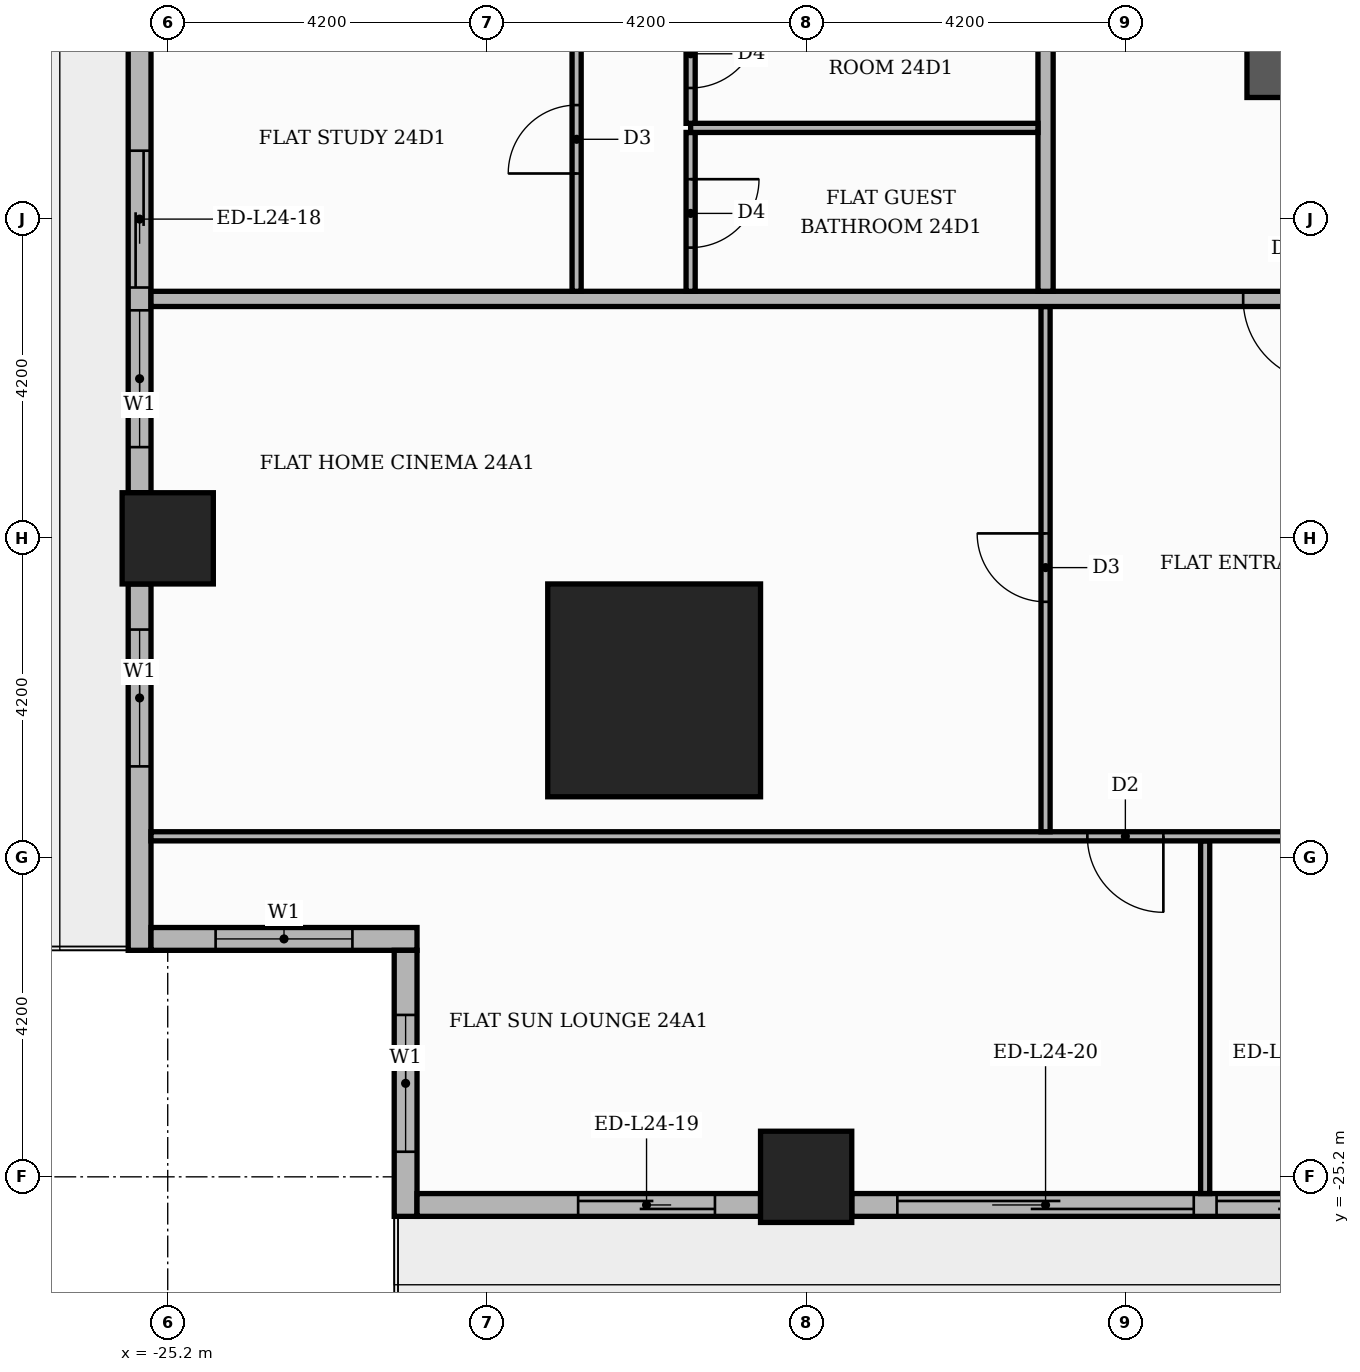
"""IFC4 building model, lengths in metres.
Left out: names, types, materials, properties, quantities, classifications, styles, units other than length and angle.
Written with IfcOpenShell. Run it as: python <this file> out.ifc"""

import sys

from ifc_helpers import new_model, si_unit, direction, frame, frame_2d, origin, origin_2d, place, context, subcontext, project, spatial, rectangle, extrude, element, fill, save


model = new_model("IFC4")
c1 = context("Model", 3, precision=1e-05, world=origin(), true_north=direction((0.0, 1.0)))
c2 = subcontext(c1, "Body", "Model", "MODEL_VIEW")
j1 = project(units=[si_unit("LENGTHUNIT", "METRE"), si_unit("PLANEANGLEUNIT", "RADIAN")], contexts=[c1])
p1 = place(None, origin())
s1 = spatial("IfcSite", under=j1, at=p1, CompositionType="ELEMENT")
p2 = place(p1, origin())
s2 = spatial("IfcBuilding", under=s1, at=p2, CompositionType="ELEMENT")
p3 = place(p2, frame((0.0, 0.0, 102.6)))
s3 = spatial("IfcBuildingStorey", under=s2, at=p3, CompositionType="ELEMENT", Elevation=102.6)
p4 = place(p3, frame((-11.0, -10.55, 0.0), z_axis=(0.0, 0.0, 1.0), x_axis=(1.0, 0.0, 0.0)))
e1 = element("IfcWall", 1, at=p4, inside=s3, PredefinedType="SHEAR", context=c2, shape_type="SweptSolid", body=[
    extrude(rectangle(XDim=22.0, YDim=0.9, at=frame_2d((11.0, 0.0))), origin(), (0.0, 0.0, 1.0), 3.48),
])
p5 = place(p4, frame((7.4, 0.0, 0.0)))
e2 = element("IfcOpeningElement", 2, at=p5, cuts=e1, PredefinedType="OPENING", context=c2, shape_type="SweptSolid", body=[
    extrude(rectangle(XDim=1.8, YDim=2.2, at=frame_2d((0.9, 1.1))), frame((0.0, 0.46, 0.0), z_axis=(0.0, -1.0, 0.0), x_axis=(1.0, 0.0, 0.0)), (0.0, 0.0, 1.0), 0.92),
])
p6 = place(p3, frame((-18.8, -18.8, 0.0), z_axis=(0.0, 0.0, 1.0), x_axis=(1.0, 0.0, 0.0)))
e3 = element("IfcColumn", 3, at=p6, inside=s3, PredefinedType="COLUMN", context=c2, shape_type="SweptSolid", body=[
    extrude(rectangle(XDim=2.8, YDim=2.8, at=origin_2d()), origin(), (0.0, 0.0, 1.0), 3.9),
])
for number, where, z_axis, x_axis in (
    (4, (-16.8, -25.2, 0.0), (0.0, 0.0, 1.0), (1.0, 0.0, 0.0)),
    (5, (-25.2, -16.8, 0.0), (0.0, 0.0, 1.0), (1.0, 0.0, 0.0)),
):
    element("IfcColumn", number, at=place(p3, frame(where, z_axis=z_axis, x_axis=x_axis)), inside=s3, PredefinedType="COLUMN", context=c2, shape_type="SweptSolid", body=[
        extrude(rectangle(XDim=1.2, YDim=1.2, at=origin_2d()), origin(), (0.0, 0.0, 1.0), 3.9),
    ])
p7 = place(p3, frame((-25.57, -9.75, 0.0), z_axis=(0.0, 0.0, 1.0), x_axis=(0.0, -1.0, 0.0)))
e6 = element("IfcWall", 6, at=p7, inside=s3, PredefinedType="STANDARD", context=c2, shape_type="SweptSolid", body=[
    extrude(rectangle(XDim=6.45, YDim=0.3, at=frame_2d((3.225, 0.0))), origin(), (0.0, 0.0, 1.0), 3.48),
])
p8 = place(p7, frame((1.95, 0.0, 0.0)))
e7 = element("IfcOpeningElement", 7, at=p8, cuts=e6, PredefinedType="OPENING", context=c2, shape_type="SweptSolid", body=[
    extrude(rectangle(XDim=1.8, YDim=2.4, at=frame_2d((0.9, 1.2))), frame((0.0, 0.16, 0.0), z_axis=(0.0, -1.0, 0.0), x_axis=(1.0, 0.0, 0.0)), (0.0, 0.0, 1.0), 0.32),
])
p9 = place(p7, frame((4.05, 0.0, 0.9)))
e8 = element("IfcOpeningElement", 8, at=p9, cuts=e6, PredefinedType="OPENING", context=c2, shape_type="SweptSolid", body=[
    extrude(rectangle(XDim=1.8, YDim=2.1, at=frame_2d((0.9, 1.05))), frame((0.0, 0.16, 0.0), z_axis=(0.0, -1.0, 0.0), x_axis=(1.0, 0.0, 0.0)), (0.0, 0.0, 1.0), 0.32),
])
p10 = place(p3, frame((-25.57, -17.4, 0.0), z_axis=(0.0, 0.0, 1.0), x_axis=(0.0, -1.0, 0.0)))
e9 = element("IfcWall", 9, at=p10, inside=s3, PredefinedType="STANDARD", context=c2, shape_type="SweptSolid", body=[
    extrude(rectangle(XDim=4.82, YDim=0.3, at=frame_2d((2.41, 0.0))), origin(), (0.0, 0.0, 1.0), 3.48),
])
p11 = place(p10, frame((0.6, 0.0, 0.9)))
e10 = element("IfcOpeningElement", 10, at=p11, cuts=e9, PredefinedType="OPENING", context=c2, shape_type="SweptSolid", body=[
    extrude(rectangle(XDim=1.8, YDim=2.1, at=frame_2d((0.9, 1.05))), frame((0.0, 0.16, 0.0), z_axis=(0.0, -1.0, 0.0), x_axis=(1.0, 0.0, 0.0)), (0.0, 0.0, 1.0), 0.32),
])
p12 = place(p3, frame((-25.42, -22.07, 0.0), z_axis=(0.0, 0.0, 1.0), x_axis=(1.0, 0.0, 0.0)))
e11 = element("IfcWall", 11, at=p12, inside=s3, PredefinedType="STANDARD", context=c2, shape_type="SweptSolid", body=[
    extrude(rectangle(XDim=3.5, YDim=0.3, at=frame_2d((1.75, 0.0))), origin(), (0.0, 0.0, 1.0), 3.48),
])
p13 = place(p12, frame((0.85, 0.0, 0.9)))
e12 = element("IfcOpeningElement", 12, at=p13, cuts=e11, PredefinedType="OPENING", context=c2, shape_type="SweptSolid", body=[
    extrude(rectangle(XDim=1.8, YDim=2.1, at=frame_2d((0.9, 1.05))), frame((0.0, 0.16, 0.0), z_axis=(0.0, -1.0, 0.0), x_axis=(1.0, 0.0, 0.0)), (0.0, 0.0, 1.0), 0.32),
])
p14 = place(p3, frame((-22.07, -22.22, 0.0), z_axis=(0.0, 0.0, 1.0), x_axis=(0.0, -1.0, 0.0)))
e13 = element("IfcWall", 13, at=p14, inside=s3, PredefinedType="STANDARD", context=c2, shape_type="SweptSolid", body=[
    extrude(rectangle(XDim=3.5, YDim=0.3, at=frame_2d((1.75, 0.0))), origin(), (0.0, 0.0, 1.0), 3.48),
])
p15 = place(p14, frame((0.85, 0.0, 0.9)))
e14 = element("IfcOpeningElement", 14, at=p15, cuts=e13, PredefinedType="OPENING", context=c2, shape_type="SweptSolid", body=[
    extrude(rectangle(XDim=1.8, YDim=2.1, at=frame_2d((0.9, 1.05))), frame((0.0, 0.16, 0.0), z_axis=(0.0, -1.0, 0.0), x_axis=(1.0, 0.0, 0.0)), (0.0, 0.0, 1.0), 0.32),
])
p16 = place(p3, frame((-21.92, -25.57, 0.0), z_axis=(0.0, 0.0, 1.0), x_axis=(1.0, 0.0, 0.0)))
e15 = element("IfcWall", 15, at=p16, inside=s3, PredefinedType="STANDARD", context=c2, shape_type="SweptSolid", body=[
    extrude(rectangle(XDim=4.52, YDim=0.3, at=frame_2d((2.26, 0.0))), origin(), (0.0, 0.0, 1.0), 3.48),
])
p17 = place(p16, frame((2.12, 0.0, 0.0)))
e16 = element("IfcOpeningElement", 16, at=p17, cuts=e15, PredefinedType="OPENING", context=c2, shape_type="SweptSolid", body=[
    extrude(rectangle(XDim=1.8, YDim=2.4, at=frame_2d((0.9, 1.2))), frame((0.0, 0.16, 0.0), z_axis=(0.0, -1.0, 0.0), x_axis=(1.0, 0.0, 0.0)), (0.0, 0.0, 1.0), 0.32),
])
p18 = place(p3, frame((-16.2, -25.57, 0.0), z_axis=(0.0, 0.0, 1.0), x_axis=(1.0, 0.0, 0.0)))
e17 = element("IfcWall", 17, at=p18, inside=s3, PredefinedType="STANDARD", context=c2, shape_type="SweptSolid", body=[
    extrude(rectangle(XDim=7.2, YDim=0.3, at=frame_2d((3.6, 0.0))), origin(), (0.0, 0.0, 1.0), 3.48),
])
p19 = place(p18, frame((0.6, 0.0, 0.0)))
e18 = element("IfcOpeningElement", 18, at=p19, cuts=e17, PredefinedType="OPENING", context=c2, shape_type="SweptSolid", body=[
    extrude(rectangle(XDim=3.9, YDim=2.4, at=frame_2d((1.95, 1.2))), frame((0.0, 0.16, 0.0), z_axis=(0.0, -1.0, 0.0), x_axis=(1.0, 0.0, 0.0)), (0.0, 0.0, 1.0), 0.32),
])
p20 = place(p18, frame((4.8, 0.0, 0.0)))
e19 = element("IfcOpeningElement", 19, at=p20, cuts=e17, PredefinedType="OPENING", context=c2, shape_type="SweptSolid", body=[
    extrude(rectangle(XDim=1.8, YDim=2.4, at=frame_2d((0.9, 1.2))), frame((0.0, 0.16, 0.0), z_axis=(0.0, -1.0, 0.0), x_axis=(1.0, 0.0, 0.0)), (0.0, 0.0, 1.0), 0.32),
])
p21 = place(p3, frame((-11.55, -25.42, 0.0), z_axis=(0.0, 0.0, 1.0), x_axis=(0.0, 1.0, 0.0)))
e20 = element("IfcWall", 20, at=p21, inside=s3, PredefinedType="PARTITIONING", context=c2, shape_type="SweptSolid", body=[
    extrude(rectangle(XDim=4.64, YDim=0.12, at=frame_2d((2.32, 0.0))), origin(), (0.0, 0.0, 1.0), 3.48),
])
p22 = place(p3, frame((-25.42, -20.72, 0.0), z_axis=(0.0, 0.0, 1.0), x_axis=(1.0, 0.0, 0.0)))
e21 = element("IfcWall", 21, at=p22, inside=s3, PredefinedType="PARTITIONING", context=c2, shape_type="SweptSolid", body=[
    extrude(rectangle(XDim=38.97, YDim=0.12, at=frame_2d((19.485, 0.0))), origin(), (0.0, 0.0, 1.0), 3.48),
])
p23 = place(p22, frame((12.32, 0.0, 0.0)))
e22 = element("IfcOpeningElement", 22, at=p23, cuts=e21, PredefinedType="OPENING", context=c2, shape_type="SweptSolid", body=[
    extrude(rectangle(XDim=1.0, YDim=2.1, at=frame_2d((0.5, 1.05))), frame((0.0, 0.07, 0.0), z_axis=(0.0, -1.0, 0.0), x_axis=(1.0, 0.0, 0.0)), (0.0, 0.0, 1.0), 0.14),
])
p24 = place(p22, frame((17.57, 0.0, 0.0)))
e23 = element("IfcOpeningElement", 23, at=p24, cuts=e21, PredefinedType="OPENING", context=c2, shape_type="SweptSolid", body=[
    extrude(rectangle(XDim=1.0, YDim=2.1, at=frame_2d((0.5, 1.05))), frame((0.0, 0.07, 0.0), z_axis=(0.0, -1.0, 0.0), x_axis=(1.0, 0.0, 0.0)), (0.0, 0.0, 1.0), 0.14),
])
p25 = place(p22, frame((24.97, 0.0, 0.0)))
e24 = element("IfcOpeningElement", 24, at=p25, cuts=e21, PredefinedType="OPENING", context=c2, shape_type="SweptSolid", body=[
    extrude(rectangle(XDim=0.9, YDim=2.1, at=frame_2d((0.45, 1.05))), frame((0.0, 0.07, 0.0), z_axis=(0.0, -1.0, 0.0), x_axis=(1.0, 0.0, 0.0)), (0.0, 0.0, 1.0), 0.14),
])
p26 = place(p22, frame((34.42, 0.0, 0.0)))
e25 = element("IfcOpeningElement", 25, at=p26, cuts=e21, PredefinedType="OPENING", context=c2, shape_type="SweptSolid", body=[
    extrude(rectangle(XDim=0.9, YDim=2.1, at=frame_2d((0.45, 1.05))), frame((0.0, 0.07, 0.0), z_axis=(0.0, -1.0, 0.0), x_axis=(1.0, 0.0, 0.0)), (0.0, 0.0, 1.0), 0.14),
])
p27 = place(p3, frame((-13.65, -20.66, 0.0), z_axis=(0.0, 0.0, 1.0), x_axis=(0.0, 1.0, 0.0)))
e26 = element("IfcWall", 26, at=p27, inside=s3, PredefinedType="PARTITIONING", context=c2, shape_type="SweptSolid", body=[
    extrude(rectangle(XDim=6.91, YDim=0.12, at=frame_2d((3.455, 0.0))), origin(), (0.0, 0.0, 1.0), 3.48),
])
p28 = place(p27, frame((3.025, 0.0, 0.0)))
e27 = element("IfcOpeningElement", 27, at=p28, cuts=e26, PredefinedType="OPENING", context=c2, shape_type="SweptSolid", body=[
    extrude(rectangle(XDim=0.9, YDim=2.1, at=frame_2d((0.45, 1.05))), frame((0.0, 0.07, 0.0), z_axis=(0.0, -1.0, 0.0), x_axis=(1.0, 0.0, 0.0)), (0.0, 0.0, 1.0), 0.14),
])
p29 = place(p3, frame((-25.42, -13.65, 0.0), z_axis=(0.0, 0.0, 1.0), x_axis=(1.0, 0.0, 0.0)))
e28 = element("IfcWall", 28, at=p29, inside=s3, PredefinedType="PARTITIONING", context=c2, shape_type="SweptSolid", body=[
    extrude(rectangle(XDim=39.07, YDim=0.2, at=frame_2d((19.535, 0.0))), origin(), (0.0, 0.0, 1.0), 3.48),
])
p30 = place(p29, frame((14.37, 0.0, 0.0)))
e29 = element("IfcOpeningElement", 29, at=p30, cuts=e28, PredefinedType="OPENING", context=c2, shape_type="SweptSolid", body=[
    extrude(rectangle(XDim=1.1, YDim=2.4, at=frame_2d((0.55, 1.2))), frame((0.0, 0.11, 0.0), z_axis=(0.0, -1.0, 0.0), x_axis=(1.0, 0.0, 0.0)), (0.0, 0.0, 1.0), 0.22),
])
p31 = place(p3, frame((-19.82, -13.55, 0.0), z_axis=(0.0, 0.0, 1.0), x_axis=(0.0, 1.0, 0.0)))
e30 = element("IfcWall", 30, at=p31, inside=s3, PredefinedType="PARTITIONING", context=c2, shape_type="SweptSolid", body=[
    extrude(rectangle(XDim=4.04, YDim=0.12, at=frame_2d((2.02, 0.0))), origin(), (0.0, 0.0, 1.0), 3.48),
])
p32 = place(p31, frame((1.55, 0.0, 0.0)))
e31 = element("IfcOpeningElement", 31, at=p32, cuts=e30, PredefinedType="OPENING", context=c2, shape_type="SweptSolid", body=[
    extrude(rectangle(XDim=0.9, YDim=2.1, at=frame_2d((0.45, 1.05))), frame((0.0, 0.07, 0.0), z_axis=(0.0, -1.0, 0.0), x_axis=(1.0, 0.0, 0.0)), (0.0, 0.0, 1.0), 0.14),
])
p33 = place(p3, frame((-18.32, -13.55, 0.0), z_axis=(0.0, 0.0, 1.0), x_axis=(0.0, 1.0, 0.0)))
e32 = element("IfcWall", 32, at=p33, inside=s3, PredefinedType="PARTITIONING", context=c2, shape_type="SweptSolid", body=[
    extrude(rectangle(XDim=2.09, YDim=0.12, at=frame_2d((1.045, 0.0))), origin(), (0.0, 0.0, 1.0), 3.48),
])
p34 = place(p33, frame((0.575, 0.0, 0.0)))
e33 = element("IfcOpeningElement", 33, at=p34, cuts=e32, PredefinedType="OPENING", context=c2, shape_type="SweptSolid", body=[
    extrude(rectangle(XDim=0.9, YDim=2.1, at=frame_2d((0.45, 1.05))), frame((0.0, 0.07, 0.0), z_axis=(0.0, -1.0, 0.0), x_axis=(1.0, 0.0, 0.0)), (0.0, 0.0, 1.0), 0.14),
])
p35 = place(p3, frame((-13.65, -13.55, 0.0), z_axis=(0.0, 0.0, 1.0), x_axis=(0.0, 1.0, 0.0)))
e34 = element("IfcWall", 34, at=p35, inside=s3, PredefinedType="PARTITIONING", context=c2, shape_type="SweptSolid", body=[
    extrude(rectangle(XDim=27.1, YDim=0.2, at=frame_2d((13.55, 0.0))), origin(), (0.0, 0.0, 1.0), 3.48),
])
p36 = place(p35, frame((23.5, 0.0, 0.0)))
e35 = element("IfcOpeningElement", 35, at=p36, cuts=e34, PredefinedType="OPENING", context=c2, shape_type="SweptSolid", body=[
    extrude(rectangle(XDim=1.1, YDim=2.4, at=frame_2d((0.55, 1.2))), frame((0.0, 0.11, 0.0), z_axis=(0.0, -1.0, 0.0), x_axis=(1.0, 0.0, 0.0)), (0.0, 0.0, 1.0), 0.22),
])
p37 = place(p3, frame((-18.32, -11.4, 0.0), z_axis=(0.0, 0.0, 1.0), x_axis=(1.0, 0.0, 0.0)))
e36 = element("IfcWall", 36, at=p37, inside=s3, PredefinedType="PARTITIONING", context=c2, shape_type="SweptSolid", body=[
    extrude(rectangle(XDim=4.57, YDim=0.12, at=frame_2d((2.285, 0.0))), origin(), (0.0, 0.0, 1.0), 3.48),
])
p38 = place(p3, frame((-18.32, -11.34, 0.0), z_axis=(0.0, 0.0, 1.0), x_axis=(0.0, 1.0, 0.0)))
e37 = element("IfcWall", 37, at=p38, inside=s3, PredefinedType="PARTITIONING", context=c2, shape_type="SweptSolid", body=[
    extrude(rectangle(XDim=1.83, YDim=0.12, at=frame_2d((0.915, 0.0))), origin(), (0.0, 0.0, 1.0), 3.48),
])
p39 = place(p38, frame((0.465, 0.0, 0.0)))
e38 = element("IfcOpeningElement", 38, at=p39, cuts=e37, PredefinedType="OPENING", context=c2, shape_type="SweptSolid", body=[
    extrude(rectangle(XDim=0.9, YDim=2.1, at=frame_2d((0.45, 1.05))), frame((0.0, 0.07, 0.0), z_axis=(0.0, -1.0, 0.0), x_axis=(1.0, 0.0, 0.0)), (0.0, 0.0, 1.0), 0.14),
])
p40 = place(p8, origin())
e39 = element("IfcDoor", 39, at=p40, inside=s3, OperationType="SLIDING_TO_RIGHT", PredefinedType="DOOR", context=c2, shape_type="SweptSolid", body=[
    extrude(rectangle(XDim=1.8, YDim=2.4, at=frame_2d((0.9, 1.2))), frame((0.0, 0.025, 0.0), z_axis=(0.0, -1.0, 0.0), x_axis=(1.0, 0.0, 0.0)), (0.0, 0.0, 1.0), 0.05),
])
fill(e7, e39)
p41 = place(p9, origin())
e40 = element("IfcWindow", 40, at=p41, inside=s3, PartitioningType="SINGLE_PANEL", PredefinedType="WINDOW", context=c2, shape_type="SweptSolid", body=[
    extrude(rectangle(XDim=1.8, YDim=2.1, at=frame_2d((0.9, 1.05))), frame((0.0, 0.03, 0.0), z_axis=(0.0, -1.0, 0.0), x_axis=(1.0, 0.0, 0.0)), (0.0, 0.0, 1.0), 0.06),
])
fill(e8, e40)
p42 = place(p11, origin())
e41 = element("IfcWindow", 41, at=p42, inside=s3, PartitioningType="SINGLE_PANEL", PredefinedType="WINDOW", context=c2, shape_type="SweptSolid", body=[
    extrude(rectangle(XDim=1.8, YDim=2.1, at=frame_2d((0.9, 1.05))), frame((0.0, 0.03, 0.0), z_axis=(0.0, -1.0, 0.0), x_axis=(1.0, 0.0, 0.0)), (0.0, 0.0, 1.0), 0.06),
])
fill(e10, e41)
p43 = place(p13, origin())
e42 = element("IfcWindow", 42, at=p43, inside=s3, PartitioningType="SINGLE_PANEL", PredefinedType="WINDOW", context=c2, shape_type="SweptSolid", body=[
    extrude(rectangle(XDim=1.8, YDim=2.1, at=frame_2d((0.9, 1.05))), frame((0.0, 0.03, 0.0), z_axis=(0.0, -1.0, 0.0), x_axis=(1.0, 0.0, 0.0)), (0.0, 0.0, 1.0), 0.06),
])
fill(e12, e42)
p44 = place(p15, origin())
e43 = element("IfcWindow", 43, at=p44, inside=s3, PartitioningType="SINGLE_PANEL", PredefinedType="WINDOW", context=c2, shape_type="SweptSolid", body=[
    extrude(rectangle(XDim=1.8, YDim=2.1, at=frame_2d((0.9, 1.05))), frame((0.0, 0.03, 0.0), z_axis=(0.0, -1.0, 0.0), x_axis=(1.0, 0.0, 0.0)), (0.0, 0.0, 1.0), 0.06),
])
fill(e14, e43)
p45 = place(p17, origin())
e44 = element("IfcDoor", 44, at=p45, inside=s3, OperationType="SLIDING_TO_RIGHT", PredefinedType="DOOR", context=c2, shape_type="SweptSolid", body=[
    extrude(rectangle(XDim=1.8, YDim=2.4, at=frame_2d((0.9, 1.2))), frame((0.0, 0.025, 0.0), z_axis=(0.0, -1.0, 0.0), x_axis=(1.0, 0.0, 0.0)), (0.0, 0.0, 1.0), 0.05),
])
fill(e16, e44)
p46 = place(p19, origin())
e45 = element("IfcDoor", 45, at=p46, inside=s3, OperationType="SLIDING_TO_LEFT", PredefinedType="DOOR", context=c2, shape_type="SweptSolid", body=[
    extrude(rectangle(XDim=3.9, YDim=2.4, at=frame_2d((1.95, 1.2))), frame((0.0, 0.025, 0.0), z_axis=(0.0, -1.0, 0.0), x_axis=(1.0, 0.0, 0.0)), (0.0, 0.0, 1.0), 0.05),
])
fill(e18, e45)
p47 = place(p20, origin())
e46 = element("IfcDoor", 46, at=p47, inside=s3, OperationType="SLIDING_TO_RIGHT", PredefinedType="DOOR", context=c2, shape_type="SweptSolid", body=[
    extrude(rectangle(XDim=1.8, YDim=2.4, at=frame_2d((0.9, 1.2))), frame((0.0, 0.025, 0.0), z_axis=(0.0, -1.0, 0.0), x_axis=(1.0, 0.0, 0.0)), (0.0, 0.0, 1.0), 0.05),
])
fill(e19, e46)
p48 = place(p30, frame((1.1, 0.0, 0.0), z_axis=(0.0, 0.0, 1.0), x_axis=(-1.0, 0.0, 0.0)))
e47 = element("IfcDoor", 47, at=p48, inside=s3, OperationType="SINGLE_SWING_RIGHT", PredefinedType="DOOR", context=c2, shape_type="SweptSolid", body=[
    extrude(rectangle(XDim=1.1, YDim=2.4, at=frame_2d((0.55, 1.2))), frame((0.0, 0.025, 0.0), z_axis=(0.0, -1.0, 0.0), x_axis=(1.0, 0.0, 0.0)), (0.0, 0.0, 1.0), 0.05),
])
fill(e29, e47)
p49 = place(p28, origin())
e48 = element("IfcDoor", 48, at=p49, inside=s3, OperationType="SINGLE_SWING_RIGHT", PredefinedType="DOOR", context=c2, shape_type="SweptSolid", body=[
    extrude(rectangle(XDim=0.9, YDim=2.1, at=frame_2d((0.45, 1.05))), frame((0.0, 0.025, 0.0), z_axis=(0.0, -1.0, 0.0), x_axis=(1.0, 0.0, 0.0)), (0.0, 0.0, 1.0), 0.05),
])
fill(e27, e48)
p50 = place(p23, frame((1.0, 0.0, 0.0), z_axis=(0.0, 0.0, 1.0), x_axis=(-1.0, 0.0, 0.0)))
e49 = element("IfcDoor", 49, at=p50, inside=s3, OperationType="SINGLE_SWING_RIGHT", PredefinedType="DOOR", context=c2, shape_type="SweptSolid", body=[
    extrude(rectangle(XDim=1.0, YDim=2.1, at=frame_2d((0.5, 1.05))), frame((0.0, 0.025, 0.0), z_axis=(0.0, -1.0, 0.0), x_axis=(1.0, 0.0, 0.0)), (0.0, 0.0, 1.0), 0.05),
])
fill(e22, e49)
p51 = place(p39, frame((0.9, 0.0, 0.0), z_axis=(0.0, 0.0, 1.0), x_axis=(-1.0, 0.0, 0.0)))
e50 = element("IfcDoor", 50, at=p51, inside=s3, OperationType="SINGLE_SWING_RIGHT", PredefinedType="DOOR", context=c2, shape_type="SweptSolid", body=[
    extrude(rectangle(XDim=0.9, YDim=2.1, at=frame_2d((0.45, 1.05))), frame((0.0, 0.025, 0.0), z_axis=(0.0, -1.0, 0.0), x_axis=(1.0, 0.0, 0.0)), (0.0, 0.0, 1.0), 0.05),
])
fill(e38, e50)
p52 = place(p34, frame((0.9, 0.0, 0.0), z_axis=(0.0, 0.0, 1.0), x_axis=(-1.0, 0.0, 0.0)))
e51 = element("IfcDoor", 51, at=p52, inside=s3, OperationType="SINGLE_SWING_RIGHT", PredefinedType="DOOR", context=c2, shape_type="SweptSolid", body=[
    extrude(rectangle(XDim=0.9, YDim=2.1, at=frame_2d((0.45, 1.05))), frame((0.0, 0.025, 0.0), z_axis=(0.0, -1.0, 0.0), x_axis=(1.0, 0.0, 0.0)), (0.0, 0.0, 1.0), 0.05),
])
fill(e33, e51)
p53 = place(p32, origin())
e52 = element("IfcDoor", 52, at=p53, inside=s3, OperationType="SINGLE_SWING_LEFT", PredefinedType="DOOR", context=c2, shape_type="SweptSolid", body=[
    extrude(rectangle(XDim=0.9, YDim=2.1, at=frame_2d((0.45, 1.05))), frame((0.0, 0.025, 0.0), z_axis=(0.0, -1.0, 0.0), x_axis=(1.0, 0.0, 0.0)), (0.0, 0.0, 1.0), 0.05),
])
fill(e31, e52)
save(model, sys.argv[1])
